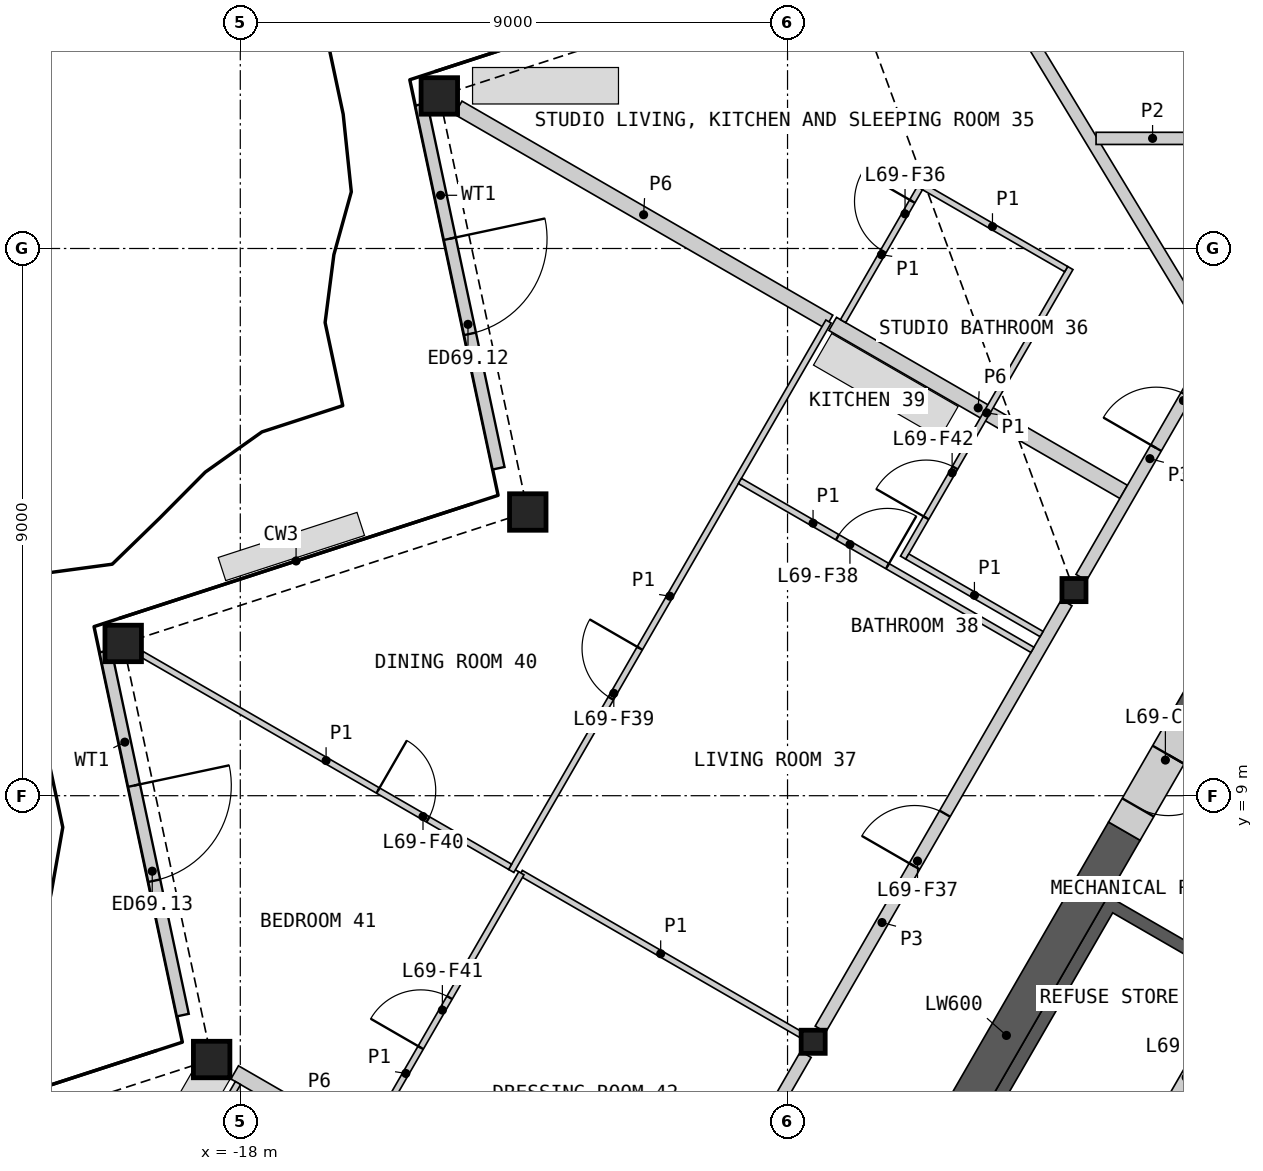
"""IFC4 building model, lengths in metres.
Left out: names, types, materials, properties, quantities, classifications, styles, units other than length and angle.
Written with IfcOpenShell. Run it as: python <this file> out.ifc"""

import sys

from ifc_helpers import new_model, si_unit, direction, frame, frame_2d, origin, origin_2d, place, context, subcontext, project, spatial, polyline, rectangle, hollow_rectangle, i_section, outline, extrude, element, fill, save


model = new_model("IFC4")
c1 = context("Model", 3, precision=1e-05, world=origin(), true_north=direction((0.0, 1.0)))
c2 = subcontext(c1, "Body", "Model", "MODEL_VIEW")
j1 = project(units=[si_unit("LENGTHUNIT", "METRE"), si_unit("PLANEANGLEUNIT", "RADIAN")], contexts=[c1])
p1 = place(None, origin())
s1 = spatial("IfcSite", under=j1, at=p1, CompositionType="ELEMENT")
p2 = place(p1, origin())
s2 = spatial("IfcBuilding", under=s1, at=p2, CompositionType="ELEMENT")
p3 = place(p2, frame((0.0, 0.0, 315.4)))
s3 = spatial("IfcBuildingStorey", under=s2, at=p3, CompositionType="ELEMENT", Elevation=315.4)
for number, where, z_axis, x_axis in (
    (1, (-14.727, 20.509, 0.0), (0.0, 0.0, 1.0), (1.0, 0.0, 0.0)),
    (2, (-13.272, 13.666, 0.0), (0.0, 0.0, 1.0), (1.0, 0.0, 0.0)),
    (3, (-19.926, 11.504, 0.0), (0.0, 0.0, 1.0), (1.0, 0.0, 0.0)),
    (4, (-18.471, 4.661, 0.0), (0.0, 0.0, 1.0), (1.0, 0.0, 0.0)),
):
    element("IfcColumn", number, at=place(p3, frame(where, z_axis=z_axis, x_axis=x_axis)), inside=s3, PredefinedType="COLUMN", context=c2, shape_type="SweptSolid", body=[
        extrude(hollow_rectangle(XDim=0.6, YDim=0.6, WallThickness=0.04, at=origin_2d()), origin(), (0.0, 0.0, 1.0), 3.4),
    ])
for number, where, z_axis, x_axis in (
    (5, (-4.289, 12.382, 0.0), (0.0, 0.0, 1.0), (1.0, 0.0, 0.0)),
    (6, (-8.578, 4.953, 0.0), (0.0, 0.0, 1.0), (1.0, 0.0, 0.0)),
):
    element("IfcColumn", number, at=place(p3, frame(where, z_axis=z_axis, x_axis=x_axis)), inside=s3, PredefinedType="COLUMN", context=c2, shape_type="SweptSolid", body=[
        extrude(i_section(OverallWidth=0.396, OverallDepth=0.381, WebThickness=0.019, FlangeThickness=0.03, at=origin_2d()), origin(), (0.0, 0.0, 1.0), 3.4),
    ])
p4 = place(p3, frame((-15.025, 20.372, 0.0), z_axis=(0.0, 0.0, 1.0), x_axis=(0.207932234858, -0.978143233738, 0.0)))
e7 = element("IfcWall", 7, at=p4, inside=s3, PredefinedType="SOLIDWALL", context=c2, shape_type="SweptSolid", body=[
    extrude(rectangle(XDim=6.12, YDim=0.2, at=frame_2d((3.06, 0.0))), origin(), (0.0, 0.0, 1.0), 2.488),
])
p5 = place(p4, frame((2.26, 0.0, 0.0)))
e8 = element("IfcOpeningElement", 8, at=p5, cuts=e7, PredefinedType="OPENING", context=c2, shape_type="SweptSolid", body=[
    extrude(rectangle(XDim=1.6, YDim=2.25, at=frame_2d((0.8, 1.125))), frame((0.0, 0.11, 0.0), z_axis=(0.0, -1.0, 0.0), x_axis=(1.0, 0.0, 0.0)), (0.0, 0.0, 1.0), 0.22),
])
p6 = place(p3, frame((-20.217, 11.377, 0.0), z_axis=(0.0, 0.0, 1.0), x_axis=(0.207885951908, -0.978153071354, 0.0)))
e9 = element("IfcWall", 9, at=p6, inside=s3, PredefinedType="SOLIDWALL", context=c2, shape_type="SweptSolid", body=[
    extrude(rectangle(XDim=6.12, YDim=0.2, at=frame_2d((3.06, 0.0))), origin(), (0.0, 0.0, 1.0), 2.488),
])
p7 = place(p6, frame((2.26, 0.0, 0.0)))
e10 = element("IfcOpeningElement", 10, at=p7, cuts=e9, PredefinedType="OPENING", context=c2, shape_type="SweptSolid", body=[
    extrude(rectangle(XDim=1.6, YDim=2.25, at=frame_2d((0.8, 1.125))), frame((0.0, 0.11, 0.0), z_axis=(0.0, -1.0, 0.0), x_axis=(1.0, 0.0, 0.0)), (0.0, 0.0, 1.0), 0.22),
])
p8 = place(p3, origin())
e11 = element("IfcWall", 11, at=p8, inside=s3, PredefinedType="SHEAR", context=c2, shape_type="SweptSolid", body=[
    extrude(outline(polyline([(-4.96, 0.208), (-7.131, 1.461), (-3.731, 7.35), (-1.561, 6.097), (-1.66, 5.924), (-3.652, 7.074), (-5.752, 3.437), (-3.76, 2.287), (-3.861, 2.113), (-5.852, 3.263), (-6.852, 1.531), (-4.861, 0.381), (-4.96, 0.208)])), origin(), (0.0, 0.0, 1.0), 3.1),
])
p9 = place(p3, frame((-1.631, 5.776, 0.0), z_axis=(0.0, 0.0, 1.0), x_axis=(-0.499992876559, -0.866029516466, 0.0)))
e12 = element("IfcWall", 12, at=p9, inside=s3, PredefinedType="SOLIDWALL", context=c2, shape_type="SweptSolid", body=[
    extrude(rectangle(XDim=6.486, YDim=0.2, at=frame_2d((3.243, 0.0))), origin(), (0.0, 0.0, 1.0), 3.1),
])
p10 = place(p9, frame((1.537, 0.0, 0.0)))
e13 = element("IfcOpeningElement", 13, at=p10, cuts=e12, PredefinedType="OPENING", context=c2, shape_type="SweptSolid", body=[
    extrude(rectangle(XDim=0.9, YDim=2.1, at=frame_2d((0.45, 1.05))), frame((0.0, 0.11, 0.0), z_axis=(0.0, -1.0, 0.0), x_axis=(1.0, 0.0, 0.0)), (0.0, 0.0, 1.0), 0.22),
])
p11 = place(p9, frame((4.837, 0.0, 0.0)))
e14 = element("IfcOpeningElement", 14, at=p11, cuts=e12, PredefinedType="OPENING", context=c2, shape_type="SweptSolid", body=[
    extrude(rectangle(XDim=0.9, YDim=2.1, at=frame_2d((0.45, 1.05))), frame((0.0, 0.11, 0.0), z_axis=(0.0, -1.0, 0.0), x_axis=(1.0, 0.0, 0.0)), (0.0, 0.0, 1.0), 0.22),
])
p12 = place(p3, frame((-3.461, 8.417, 0.0), z_axis=(0.0, 0.0, 1.0), x_axis=(-0.50000391502, -0.866023143435, 0.0)))
e15 = element("IfcWall", 15, at=p12, inside=s3, PredefinedType="SHEAR", context=c2, shape_type="SweptSolid", body=[
    extrude(rectangle(XDim=7.759, YDim=0.6, at=frame_2d((3.879, 0.0))), origin(), (0.0, 0.0, 1.0), 3.1),
])
p13 = place(p3, frame((-1.59, 11.658, 0.0), z_axis=(0.0, 0.0, 1.0), x_axis=(-0.500037594623, -0.866003697431, 0.0)))
e16 = element("IfcWall", 16, at=p13, inside=s3, PredefinedType="SHEAR", context=c2, shape_type="SweptSolid", body=[
    extrude(rectangle(XDim=1.542, YDim=0.6, at=frame_2d((0.771, 0.0))), origin(), (0.0, 0.0, 1.0), 3.1),
])
p14 = place(p3, frame((-2.361, 10.322, 0.0), z_axis=(0.0, 0.0, 1.0), x_axis=(-0.499946605688, -0.86605622881, 0.0)))
e17 = element("IfcWall", 17, at=p14, inside=s3, PredefinedType="SHEAR", context=c2, shape_type="SweptSolid", body=[
    extrude(rectangle(XDim=2.2, YDim=0.6, at=frame_2d((1.1, 0.0))), origin(), (0.0, 0.0, 1.0), 3.1),
])
p15 = place(p14, frame((0.75, 0.0, 0.0)))
e18 = element("IfcOpeningElement", 18, at=p15, cuts=e17, PredefinedType="OPENING", context=c2, shape_type="SweptSolid", body=[
    extrude(rectangle(XDim=1.0, YDim=2.1, at=frame_2d((0.5, 1.05))), frame((0.0, 0.31, 0.0), z_axis=(0.0, -1.0, 0.0), x_axis=(1.0, 0.0, 0.0)), (0.0, 0.0, 1.0), 0.62),
])
p16 = place(p3, frame((-8.458, 5.16, 0.0), z_axis=(0.0, 0.0, 1.0), x_axis=(0.499984266882, 0.866034487114, 0.0)))
e19 = element("IfcWall", 19, at=p16, inside=s3, PredefinedType="PARTITIONING", context=c2, shape_type="SweptSolid", body=[
    extrude(rectangle(XDim=8.099, YDim=0.2, at=frame_2d((4.049, 0.0))), origin(), (0.0, 0.0, 1.0), 3.1),
])
p17 = place(p16, frame((3.093, 0.0, 0.0)))
e20 = element("IfcOpeningElement", 20, at=p17, cuts=e19, PredefinedType="OPENING", context=c2, shape_type="SweptSolid", body=[
    extrude(rectangle(XDim=1.0, YDim=2.1, at=frame_2d((0.5, 1.05))), frame((0.0, 0.11, 0.0), z_axis=(0.0, -1.0, 0.0), x_axis=(1.0, 0.0, 0.0)), (0.0, 0.0, 1.0), 0.22),
])
p18 = place(p3, frame((-12.748, -2.269, 0.0), z_axis=(0.0, 0.0, 1.0), x_axis=(0.499984266882, 0.866034487114, 0.0)))
e21 = element("IfcWall", 21, at=p18, inside=s3, PredefinedType="PARTITIONING", context=c2, shape_type="SweptSolid", body=[
    extrude(rectangle(XDim=8.099, YDim=0.2, at=frame_2d((4.049, 0.0))), origin(), (0.0, 0.0, 1.0), 3.1),
])
p19 = place(p18, frame((1.164, 0.0, 0.0)))
e22 = element("IfcOpeningElement", 22, at=p19, cuts=e21, PredefinedType="OPENING", context=c2, shape_type="SweptSolid", body=[
    extrude(rectangle(XDim=1.0, YDim=2.1, at=frame_2d((0.5, 1.05))), frame((0.0, 0.11, 0.0), z_axis=(0.0, -1.0, 0.0), x_axis=(1.0, 0.0, 0.0)), (0.0, 0.0, 1.0), 0.22),
])
p20 = place(p3, frame((-14.417, 20.316, 0.0), z_axis=(0.0, 0.0, 1.0), x_axis=(0.866022207469, -0.50000553614, 0.0)))
e23 = element("IfcWall", 23, at=p20, inside=s3, PredefinedType="PARTITIONING", context=c2, shape_type="SweptSolid", body=[
    extrude(rectangle(XDim=7.042, YDim=0.25, at=frame_2d((3.521, 0.0))), origin(), (0.0, 0.0, 1.0), 2.33),
])
p21 = place(p3, frame((-8.257, 16.76, 0.0), z_axis=(0.0, 0.0, 1.0), x_axis=(0.866034739526, -0.499983829672, 0.0)))
e24 = element("IfcWall", 24, at=p21, inside=s3, PredefinedType="PARTITIONING", context=c2, shape_type="SweptSolid", body=[
    extrude(rectangle(XDim=5.525, YDim=0.25, at=frame_2d((2.763, 0.0))), origin(), (0.0, 0.0, 1.0), 2.33),
])
p22 = place(p3, frame((-4.169, 12.59, 0.0), z_axis=(0.0, 0.0, 1.0), x_axis=(0.499950370306, 0.866054055606, 0.0)))
e25 = element("IfcWall", 25, at=p22, inside=s3, PredefinedType="PARTITIONING", context=c2, shape_type="SweptSolid", body=[
    extrude(rectangle(XDim=4.513, YDim=0.2, at=frame_2d((2.256, 0.0))), origin(), (0.0, 0.0, 1.0), 3.1),
])
p23 = place(p22, frame((2.459, 0.0, 0.0)))
e26 = element("IfcOpeningElement", 26, at=p23, cuts=e25, PredefinedType="OPENING", context=c2, shape_type="SweptSolid", body=[
    extrude(rectangle(XDim=1.0, YDim=2.1, at=frame_2d((0.5, 1.05))), frame((0.0, 0.11, 0.0), z_axis=(0.0, -1.0, 0.0), x_axis=(1.0, 0.0, 0.0)), (0.0, 0.0, 1.0), 0.22),
])
p24 = place(p3, frame((-18.092, 4.449, 0.0), z_axis=(0.0, 0.0, 1.0), x_axis=(0.866043267704, -0.499969057507, 0.0)))
e27 = element("IfcWall", 27, at=p24, inside=s3, PredefinedType="PARTITIONING", context=c2, shape_type="SweptSolid", body=[
    extrude(rectangle(XDim=2.571, YDim=0.25, at=frame_2d((1.286, 0.0))), origin(), (0.0, 0.0, 1.0), 2.33),
])
p25 = place(p3, frame((-9.669, 29.144, 0.0), z_axis=(0.0, 0.0, 1.0), x_axis=(0.517770554559, -0.85551952218, 0.0)))
e28 = element("IfcWall", 28, at=p25, inside=s3, PredefinedType="PARTITIONING", context=c2, shape_type="SweptSolid", body=[
    extrude(rectangle(XDim=14.784, YDim=0.2, at=frame_2d((7.392, 0.0))), origin(), (0.0, 0.0, 1.0), 2.33),
])
p26 = place(p3, frame((-3.926, 19.811, 0.0), z_axis=(0.0, 0.0, 1.0), x_axis=(1.0, 0.0, 0.0)))
e29 = element("IfcWall", 29, at=p26, inside=s3, PredefinedType="PARTITIONING", context=c2, shape_type="SweptSolid", body=[
    extrude(rectangle(XDim=3.718, YDim=0.2, at=frame_2d((1.859, 0.0))), origin(), (0.0, 0.0, 1.0), 2.33),
])
p27 = place(p26, frame((1.59, 0.0, 0.0)))
e30 = element("IfcOpeningElement", 30, at=p27, cuts=e29, PredefinedType="OPENING", context=c2, shape_type="SweptSolid", body=[
    extrude(rectangle(XDim=0.95, YDim=2.1, at=frame_2d((0.475, 1.05))), frame((0.0, 0.11, 0.0), z_axis=(0.0, -1.0, 0.0), x_axis=(1.0, 0.0, 0.0)), (0.0, 0.0, 1.0), 0.22),
])
p28 = place(p3, frame((-13.544, 7.762, 0.0), z_axis=(0.0, 0.0, 1.0), x_axis=(0.499993819111, 0.866028972293, 0.0)))
e31 = element("IfcWall", 31, at=p28, inside=s3, PredefinedType="PARTITIONING", context=c2, shape_type="SweptSolid", body=[
    extrude(rectangle(XDim=10.436, YDim=0.1, at=frame_2d((5.218, 0.0))), origin(), (0.0, 0.0, 1.0), 2.33),
])
p29 = place(p28, frame((3.279, 0.0, 0.0)))
e32 = element("IfcOpeningElement", 32, at=p29, cuts=e31, PredefinedType="OPENING", context=c2, shape_type="SweptSolid", body=[
    extrude(rectangle(XDim=0.95, YDim=2.1, at=frame_2d((0.475, 1.05))), frame((0.0, 0.06, 0.0), z_axis=(0.0, -1.0, 0.0), x_axis=(1.0, 0.0, 0.0)), (0.0, 0.0, 1.0), 0.12),
])
p30 = place(p3, frame((-19.615, 11.325, 0.0), z_axis=(0.0, 0.0, 1.0), x_axis=(0.866013987544, -0.500019772988, 0.0)))
e33 = element("IfcWall", 33, at=p30, inside=s3, PredefinedType="PARTITIONING", context=c2, shape_type="SweptSolid", body=[
    extrude(rectangle(XDim=6.99, YDim=0.1, at=frame_2d((3.495, 0.0))), origin(), (0.0, 0.0, 1.0), 2.33),
])
p31 = place(p30, frame((4.48, 0.0, 0.0)))
e34 = element("IfcOpeningElement", 34, at=p31, cuts=e33, PredefinedType="OPENING", context=c2, shape_type="SweptSolid", body=[
    extrude(rectangle(XDim=0.95, YDim=2.1, at=frame_2d((0.475, 1.05))), frame((0.0, 0.06, 0.0), z_axis=(0.0, -1.0, 0.0), x_axis=(1.0, 0.0, 0.0)), (0.0, 0.0, 1.0), 0.12),
])
p32 = place(p3, frame((-9.783, 14.177, 0.0), z_axis=(0.0, 0.0, 1.0), x_axis=(0.866030435321, -0.499991285022, 0.0)))
e35 = element("IfcWall", 35, at=p32, inside=s3, PredefinedType="PARTITIONING", context=c2, shape_type="SweptSolid", body=[
    extrude(rectangle(XDim=5.555, YDim=0.1, at=frame_2d((2.778, 0.0))), origin(), (0.0, 0.0, 1.0), 2.33),
])
p33 = place(p32, frame((1.852, 0.0, 0.0)))
e36 = element("IfcOpeningElement", 36, at=p33, cuts=e35, PredefinedType="OPENING", context=c2, shape_type="SweptSolid", body=[
    extrude(rectangle(XDim=0.95, YDim=2.1, at=frame_2d((0.475, 1.05))), frame((0.0, 0.06, 0.0), z_axis=(0.0, -1.0, 0.0), x_axis=(1.0, 0.0, 0.0)), (0.0, 0.0, 1.0), 0.12),
])
p34 = place(p3, frame((-7.099, 12.915, 0.0), z_axis=(0.0, 0.0, 1.0), x_axis=(0.49997732567, 0.866038494419, 0.0)))
e37 = element("IfcWall", 37, at=p34, inside=s3, PredefinedType="PARTITIONING", context=c2, shape_type="SweptSolid", body=[
    extrude(rectangle(XDim=5.5, YDim=0.1, at=frame_2d((2.75, 0.0))), origin(), (0.0, 0.0, 1.0), 2.33),
])
p35 = place(p34, frame((0.756, 0.0, 0.0)))
e38 = element("IfcOpeningElement", 38, at=p35, cuts=e37, PredefinedType="OPENING", context=c2, shape_type="SweptSolid", body=[
    extrude(rectangle(XDim=0.95, YDim=2.1, at=frame_2d((0.475, 1.05))), frame((0.0, 0.06, 0.0), z_axis=(0.0, -1.0, 0.0), x_axis=(1.0, 0.0, 0.0)), (0.0, 0.0, 1.0), 0.12),
])
p36 = place(p3, frame((-13.386, 7.729, 0.0), z_axis=(0.0, 0.0, 1.0), x_axis=(0.866034036823, -0.49998504684, 0.0)))
e39 = element("IfcWall", 39, at=p36, inside=s3, PredefinedType="PARTITIONING", context=c2, shape_type="SweptSolid", body=[
    extrude(rectangle(XDim=5.312, YDim=0.1, at=frame_2d((2.656, 0.0))), origin(), (0.0, 0.0, 1.0), 2.33),
])
p37 = place(p3, frame((-15.912, 3.335, 0.0), z_axis=(0.0, 0.0, 1.0), x_axis=(0.49999906822, 0.866025941747, 0.0)))
e40 = element("IfcWall", 40, at=p37, inside=s3, PredefinedType="PARTITIONING", context=c2, shape_type="SweptSolid", body=[
    extrude(rectangle(XDim=5.068, YDim=0.1, at=frame_2d((2.534, 0.0))), origin(), (0.0, 0.0, 1.0), 2.33),
])
p38 = place(p37, frame((1.757, 0.0, 0.0)))
e41 = element("IfcOpeningElement", 41, at=p38, cuts=e40, PredefinedType="OPENING", context=c2, shape_type="SweptSolid", body=[
    extrude(rectangle(XDim=0.95, YDim=2.1, at=frame_2d((0.475, 1.05))), frame((0.0, 0.06, 0.0), z_axis=(0.0, -1.0, 0.0), x_axis=(1.0, 0.0, 0.0)), (0.0, 0.0, 1.0), 0.12),
])
p39 = place(p3, frame((-20.547, -0.072, 0.0), z_axis=(0.0, 0.0, 1.0), x_axis=(0.499969537666, 0.866042990507, 0.0)))
e42 = element("IfcWall", 42, at=p39, inside=s3, PredefinedType="PARTITIONING", context=c2, shape_type="SweptSolid", body=[
    extrude(rectangle(XDim=5.018, YDim=0.1, at=frame_2d((2.509, 0.0))), origin(), (0.0, 0.0, 1.0), 2.33),
])
p40 = place(p39, frame((0.862, 0.0, 0.0)))
e43 = element("IfcOpeningElement", 43, at=p40, cuts=e42, PredefinedType="OPENING", context=c2, shape_type="SweptSolid", body=[
    extrude(rectangle(XDim=0.95, YDim=2.1, at=frame_2d((0.475, 1.05))), frame((0.0, 0.06, 0.0), z_axis=(0.0, -1.0, 0.0), x_axis=(1.0, 0.0, 0.0)), (0.0, 0.0, 1.0), 0.12),
])
p41 = place(p3, frame((-6.842, 19.06, 0.0), z_axis=(0.0, 0.0, 1.0), x_axis=(0.866034573852, -0.49998411664, 0.0)))
e44 = element("IfcWall", 44, at=p41, inside=s3, PredefinedType="PARTITIONING", context=c2, shape_type="SweptSolid", body=[
    extrude(rectangle(XDim=2.8, YDim=0.1, at=frame_2d((1.4, 0.0))), origin(), (0.0, 0.0, 1.0), 2.33),
])
p42 = place(p3, frame((-7.031, 12.934, 0.0), z_axis=(0.0, 0.0, 1.0), x_axis=(0.866030925526, -0.499990435942, 0.0)))
e45 = element("IfcWall", 45, at=p42, inside=s3, PredefinedType="PARTITIONING", context=c2, shape_type="SweptSolid", body=[
    extrude(rectangle(XDim=2.55, YDim=0.1, at=frame_2d((1.275, 0.0))), origin(), (0.0, 0.0, 1.0), 2.33),
])
p43 = place(p3, frame((-8.086, 16.805, 0.0), z_axis=(0.0, 0.0, 1.0), x_axis=(0.50001820224, 0.866014894461, 0.0)))
e46 = element("IfcWall", 46, at=p43, inside=s3, PredefinedType="PARTITIONING", context=c2, shape_type="SweptSolid", body=[
    extrude(rectangle(XDim=2.525, YDim=0.1, at=frame_2d((1.262, 0.0))), origin(), (0.0, 0.0, 1.0), 2.33),
])
p44 = place(p43, frame((1.325, 0.0, 0.0)))
e47 = element("IfcOpeningElement", 47, at=p44, cuts=e46, PredefinedType="OPENING", context=c2, shape_type="SweptSolid", body=[
    extrude(rectangle(XDim=0.95, YDim=2.1, at=frame_2d((0.475, 1.05))), frame((0.0, 0.06, 0.0), z_axis=(0.0, -1.0, 0.0), x_axis=(1.0, 0.0, 0.0)), (0.0, 0.0, 1.0), 0.12),
])
p45 = place(p5, origin())
e48 = element("IfcDoor", 48, at=p45, inside=s3, OperationType="DOUBLE_DOOR_SINGLE_SWING", PredefinedType="DOOR", context=c2, shape_type="SweptSolid", body=[
    extrude(rectangle(XDim=1.6, YDim=2.25, at=frame_2d((0.8, 1.125))), frame((0.0, 0.025, 0.0), z_axis=(0.0, -1.0, 0.0), x_axis=(1.0, 0.0, 0.0)), (0.0, 0.0, 1.0), 0.05),
])
fill(e8, e48)
p46 = place(p7, origin())
e49 = element("IfcDoor", 49, at=p46, inside=s3, OperationType="DOUBLE_DOOR_SINGLE_SWING", PredefinedType="DOOR", context=c2, shape_type="SweptSolid", body=[
    extrude(rectangle(XDim=1.6, YDim=2.25, at=frame_2d((0.8, 1.125))), frame((0.0, 0.025, 0.0), z_axis=(0.0, -1.0, 0.0), x_axis=(1.0, 0.0, 0.0)), (0.0, 0.0, 1.0), 0.05),
])
fill(e10, e49)
p47 = place(p10, origin())
e50 = element("IfcDoor", 50, at=p47, inside=s3, OperationType="SINGLE_SWING_LEFT", PredefinedType="DOOR", context=c2, shape_type="SweptSolid", body=[
    extrude(rectangle(XDim=0.9, YDim=2.1, at=frame_2d((0.45, 1.05))), frame((0.0, 0.025, 0.0), z_axis=(0.0, -1.0, 0.0), x_axis=(1.0, 0.0, 0.0)), (0.0, 0.0, 1.0), 0.05),
])
fill(e13, e50)
p48 = place(p15, origin())
e51 = element("IfcDoor", 51, at=p48, inside=s3, OperationType="SINGLE_SWING_LEFT", PredefinedType="DOOR", context=c2, shape_type="SweptSolid", body=[
    extrude(rectangle(XDim=1.0, YDim=2.1, at=frame_2d((0.5, 1.05))), frame((0.0, 0.055, 0.0), z_axis=(0.0, -1.0, 0.0), x_axis=(1.0, 0.0, 0.0)), (0.0, 0.0, 1.0), 0.05),
])
fill(e18, e51)
p49 = place(p23, origin())
e52 = element("IfcDoor", 52, at=p49, inside=s3, OperationType="SINGLE_SWING_LEFT", PredefinedType="DOOR", context=c2, shape_type="SweptSolid", body=[
    extrude(rectangle(XDim=1.0, YDim=2.1, at=frame_2d((0.5, 1.05))), frame((0.0, 0.025, 0.0), z_axis=(0.0, -1.0, 0.0), x_axis=(1.0, 0.0, 0.0)), (0.0, 0.0, 1.0), 0.05),
])
fill(e26, e52)
p50 = place(p44, origin())
e53 = element("IfcDoor", 53, at=p50, inside=s3, OperationType="SINGLE_SWING_RIGHT", PredefinedType="DOOR", context=c2, shape_type="SweptSolid", body=[
    extrude(rectangle(XDim=0.95, YDim=2.1, at=frame_2d((0.475, 1.05))), frame((0.0, 0.025, 0.0), z_axis=(0.0, -1.0, 0.0), x_axis=(1.0, 0.0, 0.0)), (0.0, 0.0, 1.0), 0.05),
])
fill(e47, e53)
p51 = place(p17, origin())
e54 = element("IfcDoor", 54, at=p51, inside=s3, OperationType="SINGLE_SWING_LEFT", PredefinedType="DOOR", context=c2, shape_type="SweptSolid", body=[
    extrude(rectangle(XDim=1.0, YDim=2.1, at=frame_2d((0.5, 1.05))), frame((0.0, 0.025, 0.0), z_axis=(0.0, -1.0, 0.0), x_axis=(1.0, 0.0, 0.0)), (0.0, 0.0, 1.0), 0.05),
])
fill(e20, e54)
p52 = place(p33, origin())
e55 = element("IfcDoor", 55, at=p52, inside=s3, OperationType="SINGLE_SWING_RIGHT", PredefinedType="DOOR", context=c2, shape_type="SweptSolid", body=[
    extrude(rectangle(XDim=0.95, YDim=2.1, at=frame_2d((0.475, 1.05))), frame((0.0, 0.025, 0.0), z_axis=(0.0, -1.0, 0.0), x_axis=(1.0, 0.0, 0.0)), (0.0, 0.0, 1.0), 0.05),
])
fill(e36, e55)
p53 = place(p29, origin())
e56 = element("IfcDoor", 56, at=p53, inside=s3, OperationType="SINGLE_SWING_RIGHT", PredefinedType="DOOR", context=c2, shape_type="SweptSolid", body=[
    extrude(rectangle(XDim=0.95, YDim=2.1, at=frame_2d((0.475, 1.05))), frame((0.0, 0.025, 0.0), z_axis=(0.0, -1.0, 0.0), x_axis=(1.0, 0.0, 0.0)), (0.0, 0.0, 1.0), 0.05),
])
fill(e32, e56)
p54 = place(p31, origin())
e57 = element("IfcDoor", 57, at=p54, inside=s3, OperationType="SINGLE_SWING_LEFT", PredefinedType="DOOR", context=c2, shape_type="SweptSolid", body=[
    extrude(rectangle(XDim=0.95, YDim=2.1, at=frame_2d((0.475, 1.05))), frame((0.0, 0.025, 0.0), z_axis=(0.0, -1.0, 0.0), x_axis=(1.0, 0.0, 0.0)), (0.0, 0.0, 1.0), 0.05),
])
fill(e34, e57)
p55 = place(p38, origin())
e58 = element("IfcDoor", 58, at=p55, inside=s3, OperationType="SINGLE_SWING_LEFT", PredefinedType="DOOR", context=c2, shape_type="SweptSolid", body=[
    extrude(rectangle(XDim=0.95, YDim=2.1, at=frame_2d((0.475, 1.05))), frame((0.0, 0.025, 0.0), z_axis=(0.0, -1.0, 0.0), x_axis=(1.0, 0.0, 0.0)), (0.0, 0.0, 1.0), 0.05),
])
fill(e41, e58)
p56 = place(p35, origin())
e59 = element("IfcDoor", 59, at=p56, inside=s3, OperationType="SINGLE_SWING_LEFT", PredefinedType="DOOR", context=c2, shape_type="SweptSolid", body=[
    extrude(rectangle(XDim=0.95, YDim=2.1, at=frame_2d((0.475, 1.05))), frame((0.0, 0.025, 0.0), z_axis=(0.0, -1.0, 0.0), x_axis=(1.0, 0.0, 0.0)), (0.0, 0.0, 1.0), 0.05),
])
fill(e38, e59)
save(model, sys.argv[1])
